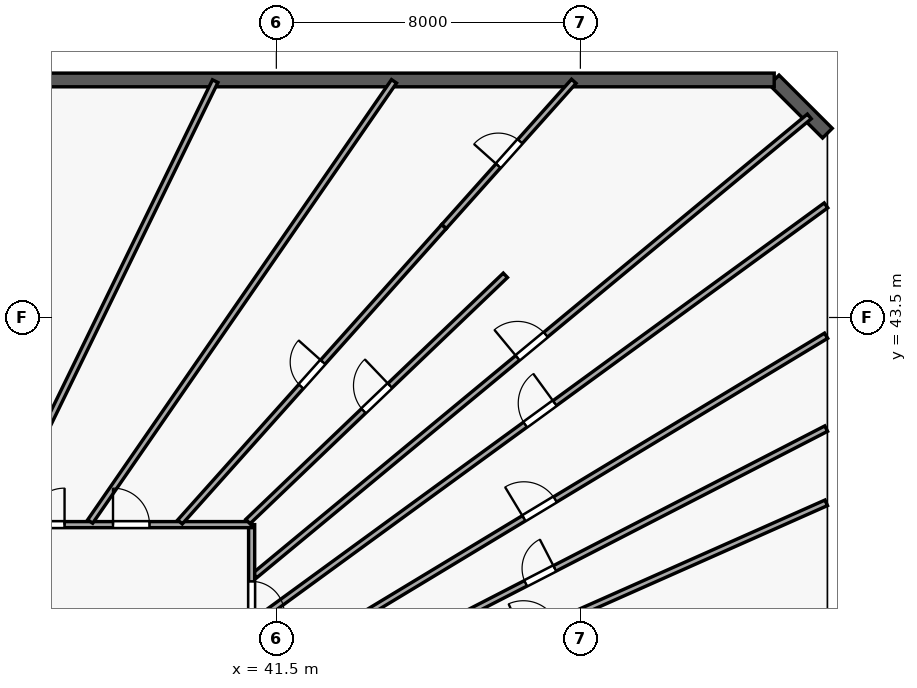
"""IFC4 building model, lengths in metres.
Left out: names, types, materials, properties, quantities, classifications, styles, units other than length and angle.
Written with IfcOpenShell. Run it as: python <this file> out.ifc"""

import sys

from ifc_helpers import new_model, si_unit, direction, frame, frame_2d, origin, origin_with_axes, origin_2d, place, context, subcontext, project, spatial, rectangle, circle, extrude, source, transform, mapped, element, fill, save


model = new_model("IFC4")
c1 = context("Model", 3, precision=1e-05, world=origin(), true_north=direction((0.0, 1.0)))
c2 = subcontext(c1, "Body", "Model", "MODEL_VIEW")
j1 = project(units=[si_unit("LENGTHUNIT", "METRE"), si_unit("PLANEANGLEUNIT", "RADIAN")], contexts=[c1])
p1 = place(None, origin())
s1 = spatial("IfcSite", under=j1, at=p1, CompositionType="ELEMENT")
p2 = place(p1, origin())
s2 = spatial("IfcBuilding", under=s1, at=p2, CompositionType="ELEMENT")
p3 = place(p2, frame((0.0, 0.0, 9.0)))
s3 = spatial("IfcBuildingStorey", under=s2, at=p3, CompositionType="ELEMENT", Elevation=9.0)
m1 = source(origin_with_axes(), c2, "Body", "SweptSolid", [
    extrude(circle(Radius=0.8, at=origin_2d()), origin(), (0.0, 0.0, 1.0), 4.5),
])
p4 = place(p3, frame((46.8, 45.5, 0.0), z_axis=(0.0, 0.0, 1.0), x_axis=(1.0, 0.0, 0.0)))
e1 = element("IfcColumn", 1, at=p4, inside=s3, PredefinedType="COLUMN", context=c2, shape_type="MappedRepresentation", body=[
    mapped(m1, transform((0.0, 0.0, 0.0), scale=1.0)),
])
m2 = source(origin_with_axes(), c2, "Body", "SweptSolid", [
    extrude(rectangle(XDim=0.6, YDim=0.9, at=origin_2d()), origin(), (0.0, 0.0, 1.0), 4.5),
])
p5 = place(p3, frame((54.8, 42.5, 0.0), z_axis=(0.0, 0.0, 1.0), x_axis=(1.0, 0.0, 0.0)))
e2 = element("IfcColumn", 2, at=p5, inside=s3, PredefinedType="PILASTER", context=c2, shape_type="MappedRepresentation", body=[
    mapped(m2, transform((0.0, 0.0, 0.0), scale=1.0)),
])
p6 = place(p3, frame((56.0, 48.35, 0.0), z_axis=(0.0, 0.0, 1.0), x_axis=(-0.707106781187, 0.707106781187, 0.0)))
e3 = element("IfcWall", 3, at=p6, inside=s3, PredefinedType="SOLIDWALL", context=c2, shape_type="SweptSolid", body=[
    extrude(rectangle(XDim=1.98, YDim=0.36, at=frame_2d((0.99, 0.0))), origin(), (0.0, 0.0, 1.0), 4.2),
])
p7 = place(p3, frame((54.6, 49.75, 0.0), z_axis=(0.0, 0.0, 1.0), x_axis=(-1.0, 0.0, 0.0)))
e4 = element("IfcWall", 4, at=p7, inside=s3, PredefinedType="SOLIDWALL", context=c2, shape_type="SweptSolid", body=[
    extrude(rectangle(XDim=49.25, YDim=0.36, at=frame_2d((24.625, 0.0))), origin(), (0.0, 0.0, 1.0), 4.2),
])
p8 = place(p7, frame((1.866, 0.0, 0.85)))
e5 = element("IfcOpeningElement", 5, at=p8, cuts=e4, PredefinedType="OPENING", context=c2, shape_type="SweptSolid", body=[
    extrude(rectangle(XDim=1.8, YDim=2.2, at=frame_2d((0.9, 1.1))), frame((0.0, 0.19, 0.0), z_axis=(0.0, -1.0, 0.0), x_axis=(1.0, 0.0, 0.0)), (0.0, 0.0, 1.0), 0.38),
])
p9 = place(p7, frame((6.763, 0.0, 0.85)))
e6 = element("IfcOpeningElement", 6, at=p9, cuts=e4, PredefinedType="OPENING", context=c2, shape_type="SweptSolid", body=[
    extrude(rectangle(XDim=1.8, YDim=2.2, at=frame_2d((0.9, 1.1))), frame((0.0, 0.19, 0.0), z_axis=(0.0, -1.0, 0.0), x_axis=(1.0, 0.0, 0.0)), (0.0, 0.0, 1.0), 0.38),
])
p10 = place(p7, frame((11.474, 0.0, 0.85)))
e7 = element("IfcOpeningElement", 7, at=p10, cuts=e4, PredefinedType="OPENING", context=c2, shape_type="SweptSolid", body=[
    extrude(rectangle(XDim=1.8, YDim=2.2, at=frame_2d((0.9, 1.1))), frame((0.0, 0.19, 0.0), z_axis=(0.0, -1.0, 0.0), x_axis=(1.0, 0.0, 0.0)), (0.0, 0.0, 1.0), 0.38),
])
p11 = place(p7, frame((16.083, 0.0, 0.85)))
e8 = element("IfcOpeningElement", 8, at=p11, cuts=e4, PredefinedType="OPENING", context=c2, shape_type="SweptSolid", body=[
    extrude(rectangle(XDim=1.8, YDim=2.2, at=frame_2d((0.9, 1.1))), frame((0.0, 0.19, 0.0), z_axis=(0.0, -1.0, 0.0), x_axis=(1.0, 0.0, 0.0)), (0.0, 0.0, 1.0), 0.38),
])
p12 = place(p7, frame((20.595, 0.0, 0.85)))
e9 = element("IfcOpeningElement", 9, at=p12, cuts=e4, PredefinedType="OPENING", context=c2, shape_type="SweptSolid", body=[
    extrude(rectangle(XDim=1.8, YDim=2.2, at=frame_2d((0.9, 1.1))), frame((0.0, 0.19, 0.0), z_axis=(0.0, -1.0, 0.0), x_axis=(1.0, 0.0, 0.0)), (0.0, 0.0, 1.0), 0.38),
])
p13 = place(p7, frame((24.23, 0.0, 0.85)))
e10 = element("IfcOpeningElement", 10, at=p13, cuts=e4, PredefinedType="OPENING", context=c2, shape_type="SweptSolid", body=[
    extrude(rectangle(XDim=1.8, YDim=2.2, at=frame_2d((0.9, 1.1))), frame((0.0, 0.19, 0.0), z_axis=(0.0, -1.0, 0.0), x_axis=(1.0, 0.0, 0.0)), (0.0, 0.0, 1.0), 0.38),
])
p14 = place(p7, frame((30.4, 0.0, 0.85)))
e11 = element("IfcOpeningElement", 11, at=p14, cuts=e4, PredefinedType="OPENING", context=c2, shape_type="SweptSolid", body=[
    extrude(rectangle(XDim=1.8, YDim=2.2, at=frame_2d((0.9, 1.1))), frame((0.0, 0.19, 0.0), z_axis=(0.0, -1.0, 0.0), x_axis=(1.0, 0.0, 0.0)), (0.0, 0.0, 1.0), 0.38),
])
p15 = place(p7, frame((35.42, 0.0, 0.85)))
e12 = element("IfcOpeningElement", 12, at=p15, cuts=e4, PredefinedType="OPENING", context=c2, shape_type="SweptSolid", body=[
    extrude(rectangle(XDim=1.8, YDim=2.2, at=frame_2d((0.9, 1.1))), frame((0.0, 0.19, 0.0), z_axis=(0.0, -1.0, 0.0), x_axis=(1.0, 0.0, 0.0)), (0.0, 0.0, 1.0), 0.38),
])
p16 = place(p7, frame((40.69, 0.0, 0.85)))
e13 = element("IfcOpeningElement", 13, at=p16, cuts=e4, PredefinedType="OPENING", context=c2, shape_type="SweptSolid", body=[
    extrude(rectangle(XDim=1.8, YDim=2.2, at=frame_2d((0.9, 1.1))), frame((0.0, 0.19, 0.0), z_axis=(0.0, -1.0, 0.0), x_axis=(1.0, 0.0, 0.0)), (0.0, 0.0, 1.0), 0.38),
])
p17 = place(p7, frame((45.58, 0.0, 0.85)))
e14 = element("IfcOpeningElement", 14, at=p17, cuts=e4, PredefinedType="OPENING", context=c2, shape_type="SweptSolid", body=[
    extrude(rectangle(XDim=1.8, YDim=2.2, at=frame_2d((0.9, 1.1))), frame((0.0, 0.19, 0.0), z_axis=(0.0, -1.0, 0.0), x_axis=(1.0, 0.0, 0.0)), (0.0, 0.0, 1.0), 0.38),
])
p18 = place(p3, frame((40.932, 36.712, 0.0), z_axis=(0.0, 0.0, 1.0), x_axis=(0.770350004389, 0.637621259635, 0.0)))
e15 = element("IfcWall", 15, at=p18, inside=s3, PredefinedType="PARTITIONING", context=c2, shape_type="SweptSolid", body=[
    extrude(rectangle(XDim=18.942, YDim=0.16, at=frame_2d((9.471, 0.0))), origin(), (0.0, 0.0, 1.0), 4.2),
])
p19 = place(p18, frame((8.979, 0.0, 0.0)))
e16 = element("IfcOpeningElement", 16, at=p19, cuts=e15, PredefinedType="OPENING", context=c2, shape_type="SweptSolid", body=[
    extrude(rectangle(XDim=0.96, YDim=2.15, at=frame_2d((0.48, 1.075))), frame((0.0, 0.09, 0.0), z_axis=(0.0, -1.0, 0.0), x_axis=(1.0, 0.0, 0.0)), (0.0, 0.0, 1.0), 0.18),
])
p20 = place(p3, frame((40.932, 35.49, 0.0), z_axis=(0.0, 0.0, 1.0), x_axis=(0.808014689356, 0.589162339076, 0.0)))
e17 = element("IfcWall", 17, at=p20, inside=s3, PredefinedType="PARTITIONING", context=c2, shape_type="SweptSolid", body=[
    extrude(rectangle(XDim=18.602, YDim=0.16, at=frame_2d((9.301, 0.0))), origin(), (0.0, 0.0, 1.0), 4.2),
])
p21 = place(p20, frame((8.808, 0.0, 0.0)))
e18 = element("IfcOpeningElement", 18, at=p21, cuts=e17, PredefinedType="OPENING", context=c2, shape_type="SweptSolid", body=[
    extrude(rectangle(XDim=0.96, YDim=2.15, at=frame_2d((0.48, 1.075))), frame((0.0, 0.09, 0.0), z_axis=(0.0, -1.0, 0.0), x_axis=(1.0, 0.0, 0.0)), (0.0, 0.0, 1.0), 0.18),
])
p22 = place(p3, frame((40.85, 38.05, 0.0), z_axis=(0.0, 0.0, 1.0), x_axis=(0.0, -1.0, 0.0)))
e19 = element("IfcWall", 19, at=p22, inside=s3, PredefinedType="PARTITIONING", context=c2, shape_type="SweptSolid", body=[
    extrude(rectangle(XDim=18.508, YDim=0.16, at=frame_2d((9.254, 0.0))), origin(), (0.0, 0.0, 1.0), 3.25),
])
p23 = place(p22, frame((13.87, 0.0, 0.0)))
e20 = element("IfcOpeningElement", 20, at=p23, cuts=e19, PredefinedType="OPENING", context=c2, shape_type="SweptSolid", body=[
    extrude(rectangle(XDim=0.96, YDim=2.15, at=frame_2d((0.48, 1.075))), frame((0.0, 0.09, 0.0), z_axis=(0.0, -1.0, 0.0), x_axis=(1.0, 0.0, 0.0)), (0.0, 0.0, 1.0), 0.18),
])
p24 = place(p22, frame((8.695, 0.0, 0.0)))
e21 = element("IfcOpeningElement", 21, at=p24, cuts=e19, PredefinedType="OPENING", context=c2, shape_type="SweptSolid", body=[
    extrude(rectangle(XDim=0.96, YDim=2.15, at=frame_2d((0.48, 1.075))), frame((0.0, 0.09, 0.0), z_axis=(0.0, -1.0, 0.0), x_axis=(1.0, 0.0, 0.0)), (0.0, 0.0, 1.0), 0.18),
])
p25 = place(p22, frame((6.334, 0.0, 0.0)))
e22 = element("IfcOpeningElement", 22, at=p25, cuts=e19, PredefinedType="OPENING", context=c2, shape_type="SweptSolid", body=[
    extrude(rectangle(XDim=0.96, YDim=2.15, at=frame_2d((0.48, 1.075))), frame((0.0, 0.09, 0.0), z_axis=(0.0, -1.0, 0.0), x_axis=(1.0, 0.0, 0.0)), (0.0, 0.0, 1.0), 0.18),
])
p26 = place(p22, frame((12.2, 0.0, 0.0)))
e23 = element("IfcOpeningElement", 23, at=p26, cuts=e19, PredefinedType="OPENING", context=c2, shape_type="SweptSolid", body=[
    extrude(rectangle(XDim=0.96, YDim=2.15, at=frame_2d((0.48, 1.075))), frame((0.0, 0.09, 0.0), z_axis=(0.0, -1.0, 0.0), x_axis=(1.0, 0.0, 0.0)), (0.0, 0.0, 1.0), 0.18),
])
p27 = place(p22, frame((2.76, 0.0, 0.0)))
e24 = element("IfcOpeningElement", 24, at=p27, cuts=e19, PredefinedType="OPENING", context=c2, shape_type="SweptSolid", body=[
    extrude(rectangle(XDim=0.86, YDim=2.04, at=frame_2d((0.43, 1.02))), frame((0.0, 0.09, 0.0), z_axis=(0.0, -1.0, 0.0), x_axis=(1.0, 0.0, 0.0)), (0.0, 0.0, 1.0), 0.18),
])
p28 = place(p22, frame((1.494, 0.0, 0.0)))
e25 = element("IfcOpeningElement", 25, at=p28, cuts=e19, PredefinedType="OPENING", context=c2, shape_type="SweptSolid", body=[
    extrude(rectangle(XDim=0.86, YDim=2.04, at=frame_2d((0.43, 1.02))), frame((0.0, 0.09, 0.0), z_axis=(0.0, -1.0, 0.0), x_axis=(1.0, 0.0, 0.0)), (0.0, 0.0, 1.0), 0.18),
])
p29 = place(p3, frame((40.919, 33.932, 0.0), z_axis=(0.0, 0.0, 1.0), x_axis=(0.855961001887, 0.517040388412, 0.0)))
e26 = element("IfcWall", 26, at=p29, inside=s3, PredefinedType="PARTITIONING", context=c2, shape_type="SweptSolid", body=[
    extrude(rectangle(XDim=17.579, YDim=0.16, at=frame_2d((8.789, 0.0))), origin(), (0.0, 0.0, 1.0), 4.2),
])
p30 = place(p29, frame((8.289, 0.0, 0.0)))
e27 = element("IfcOpeningElement", 27, at=p30, cuts=e26, PredefinedType="OPENING", context=c2, shape_type="SweptSolid", body=[
    extrude(rectangle(XDim=0.96, YDim=2.15, at=frame_2d((0.48, 1.075))), frame((0.0, 0.09, 0.0), z_axis=(0.0, -1.0, 0.0), x_axis=(1.0, 0.0, 0.0)), (0.0, 0.0, 1.0), 0.18),
])
p31 = place(p3, frame((40.919, 32.827, 0.0), z_axis=(0.0, 0.0, 1.0), x_axis=(0.8890624387, 0.457785954452, 0.0)))
e28 = element("IfcWall", 28, at=p31, inside=s3, PredefinedType="PARTITIONING", context=c2, shape_type="SweptSolid", body=[
    extrude(rectangle(XDim=16.927, YDim=0.16, at=frame_2d((8.464, 0.0))), origin(), (0.0, 0.0, 1.0), 4.2),
])
p32 = place(p31, frame((8.033, 0.0, 0.0)))
e29 = element("IfcOpeningElement", 29, at=p32, cuts=e28, PredefinedType="OPENING", context=c2, shape_type="SweptSolid", body=[
    extrude(rectangle(XDim=0.86, YDim=2.04, at=frame_2d((0.43, 1.02))), frame((0.0, 0.09, 0.0), z_axis=(0.0, -1.0, 0.0), x_axis=(1.0, 0.0, 0.0)), (0.0, 0.0, 1.0), 0.18),
])
p33 = place(p3, frame((40.932, 31.951, 0.0), z_axis=(0.0, 0.0, 1.0), x_axis=(0.914043329039, 0.405616558636, 0.0)))
e30 = element("IfcWall", 30, at=p33, inside=s3, PredefinedType="PARTITIONING", context=c2, shape_type="SweptSolid", body=[
    extrude(rectangle(XDim=16.452, YDim=0.16, at=frame_2d((8.226, 0.0))), origin(), (0.0, 0.0, 1.0), 4.2),
])
p34 = place(p33, frame((7.733, 0.0, 0.0)))
e31 = element("IfcOpeningElement", 31, at=p34, cuts=e30, PredefinedType="OPENING", context=c2, shape_type="SweptSolid", body=[
    extrude(rectangle(XDim=0.96, YDim=2.15, at=frame_2d((0.48, 1.075))), frame((0.0, 0.09, 0.0), z_axis=(0.0, -1.0, 0.0), x_axis=(1.0, 0.0, 0.0)), (0.0, 0.0, 1.0), 0.18),
])
p35 = place(p3, frame((25.4, 38.05, 0.0), z_axis=(0.0, 0.0, 1.0), x_axis=(1.0, 0.0, 0.0)))
e32 = element("IfcWall", 32, at=p35, inside=s3, PredefinedType="PARTITIONING", context=c2, shape_type="SweptSolid", body=[
    extrude(rectangle(XDim=15.45, YDim=0.16, at=frame_2d((7.725, 0.0))), origin(), (0.0, 0.0, 1.0), 4.2),
])
p36 = place(p35, frame((11.802, 0.0, 0.0)))
e33 = element("IfcOpeningElement", 33, at=p36, cuts=e32, PredefinedType="OPENING", context=c2, shape_type="SweptSolid", body=[
    extrude(rectangle(XDim=0.96, YDim=2.15, at=frame_2d((0.48, 1.075))), frame((0.0, 0.09, 0.0), z_axis=(0.0, -1.0, 0.0), x_axis=(1.0, 0.0, 0.0)), (0.0, 0.0, 1.0), 0.18),
])
p37 = place(p35, frame((9.567, 0.0, 0.0)))
e34 = element("IfcOpeningElement", 34, at=p37, cuts=e32, PredefinedType="OPENING", context=c2, shape_type="SweptSolid", body=[
    extrude(rectangle(XDim=0.96, YDim=2.15, at=frame_2d((0.48, 1.075))), frame((0.0, 0.09, 0.0), z_axis=(0.0, -1.0, 0.0), x_axis=(1.0, 0.0, 0.0)), (0.0, 0.0, 1.0), 0.18),
])
p38 = place(p35, frame((7.25, 0.0, 0.0)))
e35 = element("IfcOpeningElement", 35, at=p38, cuts=e32, PredefinedType="OPENING", context=c2, shape_type="SweptSolid", body=[
    extrude(rectangle(XDim=0.96, YDim=2.15, at=frame_2d((0.48, 1.075))), frame((0.0, 0.09, 0.0), z_axis=(0.0, -1.0, 0.0), x_axis=(1.0, 0.0, 0.0)), (0.0, 0.0, 1.0), 0.18),
])
p39 = place(p35, frame((4.933, 0.0, 0.0)))
e36 = element("IfcOpeningElement", 36, at=p39, cuts=e32, PredefinedType="OPENING", context=c2, shape_type="SweptSolid", body=[
    extrude(rectangle(XDim=0.96, YDim=2.15, at=frame_2d((0.48, 1.075))), frame((0.0, 0.09, 0.0), z_axis=(0.0, -1.0, 0.0), x_axis=(1.0, 0.0, 0.0)), (0.0, 0.0, 1.0), 0.18),
])
p40 = place(p35, frame((1.698, 0.0, 0.0)))
e37 = element("IfcOpeningElement", 37, at=p40, cuts=e32, PredefinedType="OPENING", context=c2, shape_type="SweptSolid", body=[
    extrude(rectangle(XDim=0.96, YDim=2.15, at=frame_2d((0.48, 1.075))), frame((0.0, 0.09, 0.0), z_axis=(0.0, -1.0, 0.0), x_axis=(1.0, 0.0, 0.0)), (0.0, 0.0, 1.0), 0.18),
])
p41 = place(p35, frame((3.164, 0.0, 0.0)))
e38 = element("IfcOpeningElement", 38, at=p41, cuts=e32, PredefinedType="OPENING", context=c2, shape_type="SweptSolid", body=[
    extrude(rectangle(XDim=0.86, YDim=2.04, at=frame_2d((0.43, 1.02))), frame((0.0, 0.09, 0.0), z_axis=(0.0, -1.0, 0.0), x_axis=(1.0, 0.0, 0.0)), (0.0, 0.0, 1.0), 0.18),
])
p42 = place(p3, frame((36.602, 38.132, 0.0), z_axis=(0.0, 0.0, 1.0), x_axis=(0.568083583137, 0.822970863743, 0.0)))
e39 = element("IfcWall", 39, at=p42, inside=s3, PredefinedType="PARTITIONING", context=c2, shape_type="SweptSolid", body=[
    extrude(rectangle(XDim=14.073, YDim=0.16, at=frame_2d((7.036, 0.0))), origin(), (0.0, 0.0, 1.0), 4.2),
])
p43 = place(p3, frame((34.233, 38.118, 0.0), z_axis=(0.0, 0.0, 1.0), x_axis=(0.438369218091, 0.898794986985, 0.0)))
e40 = element("IfcWall", 40, at=p43, inside=s3, PredefinedType="PARTITIONING", context=c2, shape_type="SweptSolid", body=[
    extrude(rectangle(XDim=12.906, YDim=0.16, at=frame_2d((6.453, 0.0))), origin(), (0.0, 0.0, 1.0), 4.2),
])
p44 = place(p3, frame((38.966, 38.121, 0.0), z_axis=(0.0, 0.0, 1.0), x_axis=(0.666343454818, 0.745644955875, 0.0)))
e41 = element("IfcWall", 41, at=p44, inside=s3, PredefinedType="PARTITIONING", context=c2, shape_type="SweptSolid", body=[
    extrude(rectangle(XDim=10.421, YDim=0.16, at=frame_2d((5.21, 0.0))), origin(), (0.0, 0.0, 1.0), 4.2),
])
p45 = place(p44, frame((4.781, 0.0, 0.0)))
e42 = element("IfcOpeningElement", 42, at=p45, cuts=e41, PredefinedType="OPENING", context=c2, shape_type="SweptSolid", body=[
    extrude(rectangle(XDim=0.86, YDim=2.04, at=frame_2d((0.43, 1.02))), frame((0.0, 0.09, 0.0), z_axis=(0.0, -1.0, 0.0), x_axis=(1.0, 0.0, 0.0)), (0.0, 0.0, 1.0), 0.18),
])
p46 = place(p3, frame((40.752, 38.132, 0.0), z_axis=(0.0, 0.0, 1.0), x_axis=(0.722765157253, 0.69109371829, 0.0)))
e43 = element("IfcWall", 43, at=p46, inside=s3, PredefinedType="PARTITIONING", context=c2, shape_type="SweptSolid", body=[
    extrude(rectangle(XDim=9.374, YDim=0.16, at=frame_2d((4.687, 0.0))), origin(), (0.0, 0.0, 1.0), 3.25),
])
p47 = place(p46, frame((4.212, 0.0, 0.0)))
e44 = element("IfcOpeningElement", 44, at=p47, cuts=e43, PredefinedType="OPENING", context=c2, shape_type="SweptSolid", body=[
    extrude(rectangle(XDim=0.96, YDim=2.15, at=frame_2d((0.48, 1.075))), frame((0.0, 0.09, 0.0), z_axis=(0.0, -1.0, 0.0), x_axis=(1.0, 0.0, 0.0)), (0.0, 0.0, 1.0), 0.18),
])
p48 = place(p3, frame((45.913, 45.895, 0.0), z_axis=(0.0, 0.0, 1.0), x_axis=(0.666346204372, 0.745642498735, 0.0)))
e45 = element("IfcWall", 45, at=p48, inside=s3, PredefinedType="PARTITIONING", context=c2, shape_type="SweptSolid", body=[
    extrude(rectangle(XDim=5.123, YDim=0.16, at=frame_2d((2.562, 0.0))), origin(), (0.0, 0.0, 1.0), 4.2),
])
p49 = place(p48, frame((2.142, 0.0, 0.0)))
e46 = element("IfcOpeningElement", 46, at=p49, cuts=e45, PredefinedType="OPENING", context=c2, shape_type="SweptSolid", body=[
    extrude(rectangle(XDim=0.86, YDim=2.04, at=frame_2d((0.43, 1.02))), frame((0.0, 0.09, 0.0), z_axis=(0.0, -1.0, 0.0), x_axis=(1.0, 0.0, 0.0)), (0.0, 0.0, 1.0), 0.18),
])
m3 = source(origin_with_axes(), c2, "Body", "SweptSolid", [
    extrude(rectangle(XDim=1.8, YDim=2.2, at=frame_2d((0.9, 1.1))), frame((0.0, 0.03, 0.0), z_axis=(0.0, -1.0, 0.0), x_axis=(1.0, 0.0, 0.0)), (0.0, 0.0, 1.0), 0.06),
])
p50 = place(p8, origin())
e47 = element("IfcWindow", 47, at=p50, inside=s3, PartitioningType="SINGLE_PANEL", PredefinedType="WINDOW", context=c2, shape_type="MappedRepresentation", body=[
    mapped(m3, transform((0.0, 0.0, 0.0), scale=1.0)),
])
fill(e5, e47)
p51 = place(p9, origin())
e48 = element("IfcWindow", 48, at=p51, inside=s3, PartitioningType="SINGLE_PANEL", PredefinedType="WINDOW", context=c2, shape_type="MappedRepresentation", body=[
    mapped(m3, transform((0.0, 0.0, 0.0), scale=1.0)),
])
fill(e6, e48)
p52 = place(p10, origin())
e49 = element("IfcWindow", 49, at=p52, inside=s3, PartitioningType="SINGLE_PANEL", PredefinedType="WINDOW", context=c2, shape_type="MappedRepresentation", body=[
    mapped(m3, transform((0.0, 0.0, 0.0), scale=1.0)),
])
fill(e7, e49)
p53 = place(p11, origin())
e50 = element("IfcWindow", 50, at=p53, inside=s3, PartitioningType="SINGLE_PANEL", PredefinedType="WINDOW", context=c2, shape_type="MappedRepresentation", body=[
    mapped(m3, transform((0.0, 0.0, 0.0), scale=1.0)),
])
fill(e8, e50)
m4 = source(origin_with_axes(), c2, "Body", "SweptSolid", [
    extrude(rectangle(XDim=0.96, YDim=2.15, at=frame_2d((0.48, 1.075))), frame((0.0, 0.025, 0.0), z_axis=(0.0, -1.0, 0.0), x_axis=(1.0, 0.0, 0.0)), (0.0, 0.0, 1.0), 0.05),
])
p54 = place(p30, origin())
e51 = element("IfcDoor", 51, at=p54, inside=s3, OperationType="SINGLE_SWING_LEFT", PredefinedType="DOOR", context=c2, shape_type="MappedRepresentation", body=[
    mapped(m4, transform((0.0, 0.0, 0.0), scale=1.0)),
])
fill(e27, e51)
p55 = place(p21, origin())
e52 = element("IfcDoor", 52, at=p55, inside=s3, OperationType="SINGLE_SWING_RIGHT", PredefinedType="DOOR", context=c2, shape_type="MappedRepresentation", body=[
    mapped(m4, transform((0.0, 0.0, 0.0), scale=1.0)),
])
fill(e18, e52)
p56 = place(p19, origin())
e53 = element("IfcDoor", 53, at=p56, inside=s3, OperationType="SINGLE_SWING_LEFT", PredefinedType="DOOR", context=c2, shape_type="MappedRepresentation", body=[
    mapped(m4, transform((0.0, 0.0, 0.0), scale=1.0)),
])
fill(e16, e53)
p57 = place(p47, origin())
e54 = element("IfcDoor", 54, at=p57, inside=s3, OperationType="SINGLE_SWING_RIGHT", PredefinedType="DOOR", context=c2, shape_type="MappedRepresentation", body=[
    mapped(m4, transform((0.0, 0.0, 0.0), scale=1.0)),
])
fill(e44, e54)
p58 = place(p36, origin())
e55 = element("IfcDoor", 55, at=p58, inside=s3, OperationType="SINGLE_SWING_LEFT", PredefinedType="DOOR", context=c2, shape_type="MappedRepresentation", body=[
    mapped(m4, transform((0.0, 0.0, 0.0), scale=1.0)),
])
fill(e33, e55)
p59 = place(p37, origin())
e56 = element("IfcDoor", 56, at=p59, inside=s3, OperationType="SINGLE_SWING_RIGHT", PredefinedType="DOOR", context=c2, shape_type="MappedRepresentation", body=[
    mapped(m4, transform((0.0, 0.0, 0.0), scale=1.0)),
])
fill(e34, e56)
m5 = source(origin_with_axes(), c2, "Body", "SweptSolid", [
    extrude(rectangle(XDim=0.86, YDim=2.04, at=frame_2d((0.43, 1.02))), frame((0.0, 0.025, 0.0), z_axis=(0.0, -1.0, 0.0), x_axis=(1.0, 0.0, 0.0)), (0.0, 0.0, 1.0), 0.05),
])
p60 = place(p32, origin())
e57 = element("IfcDoor", 57, at=p60, inside=s3, OperationType="SINGLE_SWING_RIGHT", PredefinedType="DOOR", context=c2, shape_type="MappedRepresentation", body=[
    mapped(m5, transform((0.0, 0.0, 0.0), scale=1.0)),
])
fill(e29, e57)
p61 = place(p28, origin())
e58 = element("IfcDoor", 58, at=p61, inside=s3, OperationType="SINGLE_SWING_RIGHT", PredefinedType="DOOR", context=c2, shape_type="MappedRepresentation", body=[
    mapped(m5, transform((0.0, 0.0, 0.0), scale=1.0)),
])
fill(e25, e58)
p62 = place(p49, origin())
e59 = element("IfcDoor", 59, at=p62, inside=s3, OperationType="SINGLE_SWING_LEFT", PredefinedType="DOOR", context=c2, shape_type="MappedRepresentation", body=[
    mapped(m5, transform((0.0, 0.0, 0.0), scale=1.0)),
])
fill(e46, e59)
p63 = place(p45, origin())
e60 = element("IfcDoor", 60, at=p63, inside=s3, OperationType="SINGLE_SWING_RIGHT", PredefinedType="DOOR", context=c2, shape_type="MappedRepresentation", body=[
    mapped(m5, transform((0.0, 0.0, 0.0), scale=1.0)),
])
fill(e42, e60)
save(model, sys.argv[1])
